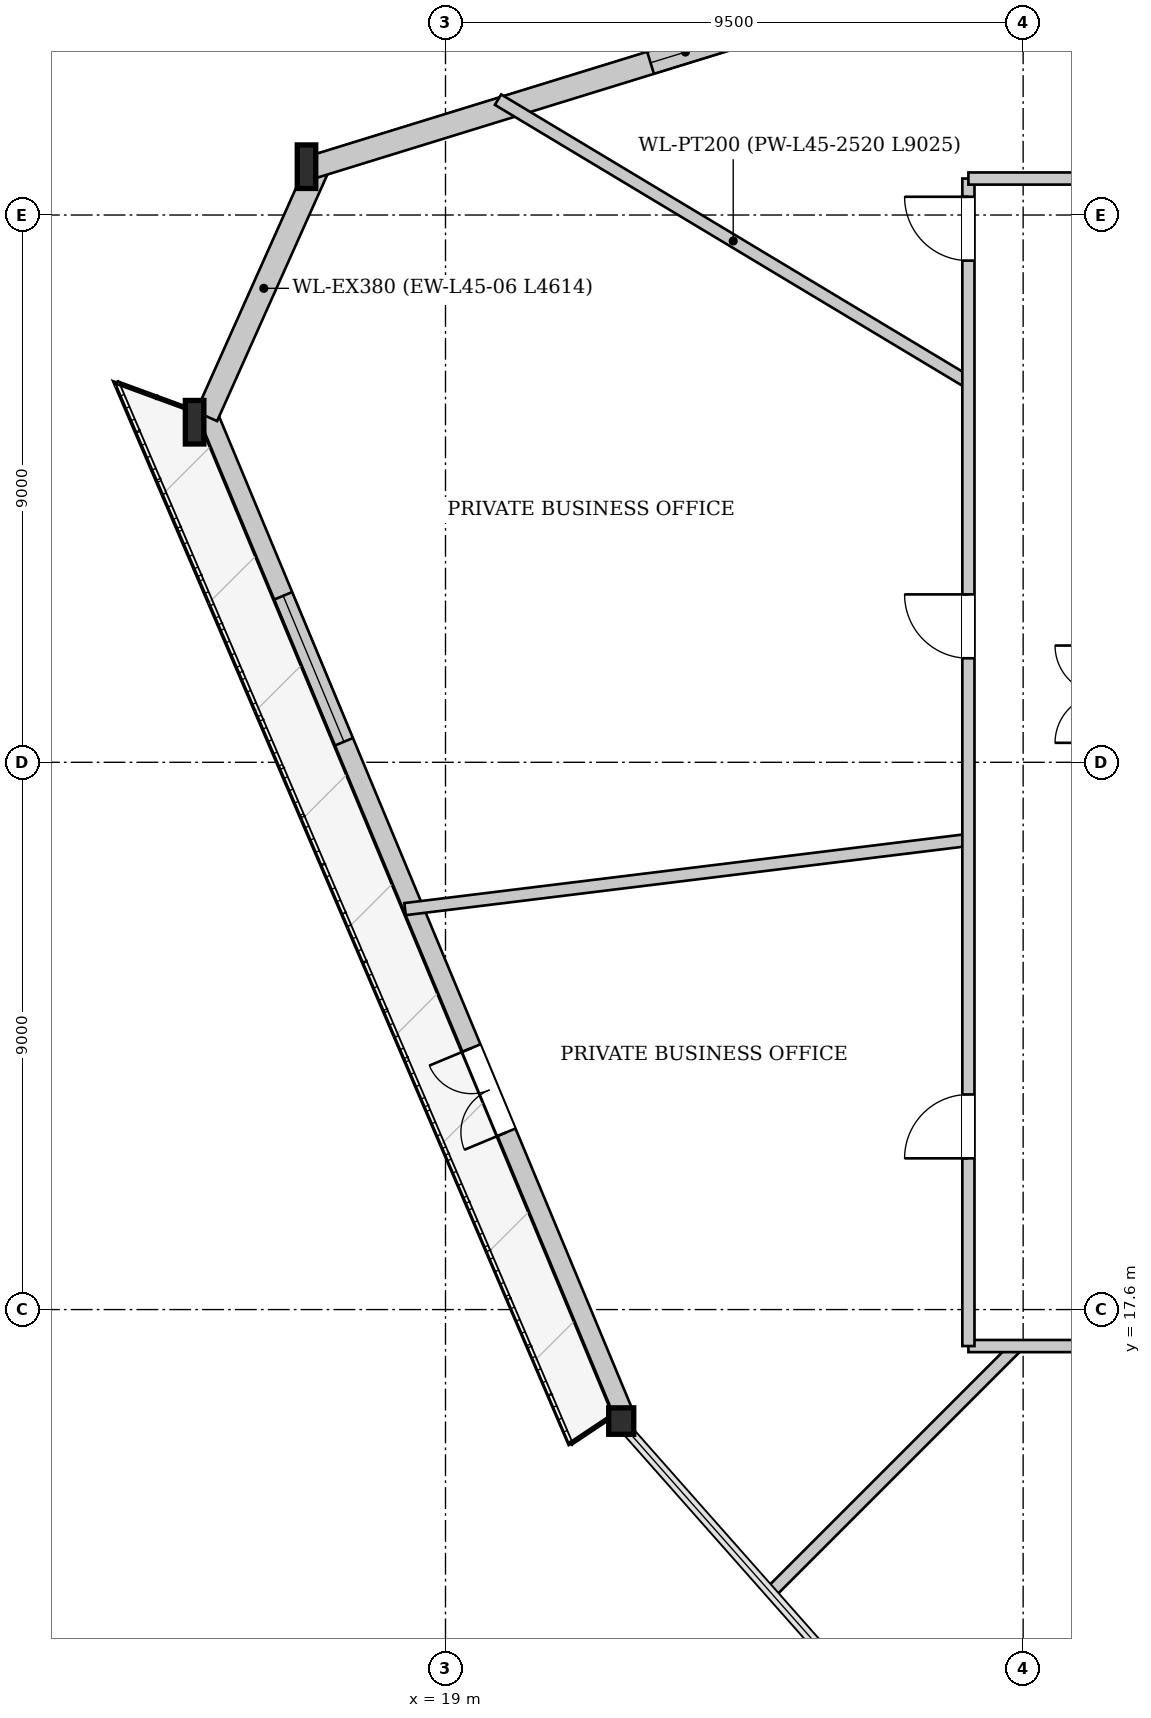
"""IFC4 building model, lengths in metres.
Left out: names, types, materials, properties, quantities, classifications, styles, units other than length and angle.
Written with IfcOpenShell. Run it as: python <this file> out.ifc"""

import sys

from ifc_helpers import new_model, si_unit, direction, frame, frame_2d, origin, origin_2d, place, context, subcontext, project, spatial, rectangle, i_section, extrude, source, transform, mapped, element, fill, save


model = new_model("IFC4")
c1 = context("Model", 3, precision=1e-05, world=origin(), true_north=direction((0.0, 1.0)))
c2 = subcontext(c1, "Body", "Model", "MODEL_VIEW")
j1 = project(units=[si_unit("LENGTHUNIT", "METRE"), si_unit("PLANEANGLEUNIT", "RADIAN")], contexts=[c1])
p1 = place(None, origin())
s1 = spatial("IfcSite", under=j1, at=p1, CompositionType="ELEMENT")
p2 = place(p1, origin())
s2 = spatial("IfcBuilding", under=s1, at=p2, CompositionType="ELEMENT")
p3 = place(p2, frame((0.0, 0.0, 171.45)))
s3 = spatial("IfcBuildingStorey", under=s2, at=p3, CompositionType="ELEMENT", Elevation=171.45)
m1 = source(origin(), c2, "Body", "SweptSolid", [
    extrude(i_section(OverallWidth=0.304, OverallDepth=0.716, WebThickness=0.021, FlangeThickness=0.04, at=origin_2d()), origin(), (0.0, 0.0, 1.0), 3.407),
])
p4 = place(p3, frame((16.781, 36.578, 0.0), z_axis=(-0.039120405694, -0.107688589299, 0.993414697693), x_axis=(0.939902925785, -0.341441781423, 0.0)))
e1 = element("IfcColumn", 1, at=p4, inside=s3, PredefinedType="COLUMN", context=c2, shape_type="MappedRepresentation", body=[
    mapped(m1, transform((0.0, 0.0, 0.0), x_axis=(1.0, 0.0, 0.0), y_axis=(0.0, 1.0, 0.0), z_axis=(0.0, 0.0, 1.0), scale=1.0)),
])
m2 = source(origin(), c2, "Body", "SweptSolid", [
    extrude(i_section(OverallWidth=0.304, OverallDepth=0.716, WebThickness=0.021, FlangeThickness=0.04, at=origin_2d()), origin(), (0.0, 0.0, 1.0), 3.403),
])
p5 = place(p3, frame((14.897, 32.366, 0.0), z_axis=(-0.013487340046, -0.102015944389, 0.994691328377), x_axis=(0.991373426138, -0.131067654089, 0.0)))
e2 = element("IfcColumn", 2, at=p5, inside=s3, PredefinedType="COLUMN", context=c2, shape_type="MappedRepresentation", body=[
    mapped(m2, transform((0.0, 0.0, 0.0), x_axis=(1.0, 0.0, 0.0), y_axis=(0.0, 1.0, 0.0), z_axis=(0.0, 0.0, 1.0), scale=1.0)),
])
m3 = source(origin(), c2, "Body", "SweptSolid", [
    extrude(i_section(OverallWidth=0.412, OverallDepth=0.435, WebThickness=0.031, FlangeThickness=0.05, at=origin_2d()), origin(), (0.0, 0.0, 1.0), 3.4),
])
p6 = place(p3, frame((21.765, 15.867, 0.0), z_axis=(0.073239735945, -0.059166218058, 0.995557783215), x_axis=(0.628408110419, 0.777883826004, 0.0)))
e3 = element("IfcColumn", 3, at=p6, inside=s3, PredefinedType="COLUMN", context=c2, shape_type="MappedRepresentation", body=[
    mapped(m3, transform((0.0, 0.0, 0.0), x_axis=(1.0, 0.0, 0.0), y_axis=(0.0, 1.0, 0.0), z_axis=(0.0, 0.0, 1.0), scale=1.0)),
])
p7 = place(p3, frame((21.913, 15.928, 0.0), z_axis=(0.0, 0.0, 1.0), x_axis=(-0.384327280835, 0.92319691356, 0.0)))
e4 = element("IfcWall", 4, at=p7, inside=s3, PredefinedType="SOLIDWALL", context=c2, shape_type="SweptSolid", body=[
    extrude(rectangle(XDim=17.872, YDim=0.32, at=frame_2d((8.936, 0.0))), origin(), (0.0, 0.0, 1.0), 2.722),
])
p8 = place(p7, frame((4.969, 0.0, 0.0)))
e5 = element("IfcOpeningElement", 5, at=p8, cuts=e4, PredefinedType="OPENING", context=c2, shape_type="SweptSolid", body=[
    extrude(rectangle(XDim=1.5, YDim=2.3, at=frame_2d((0.75, 1.15))), frame((0.0, 0.17, 0.0), z_axis=(0.0, -1.0, 0.0), x_axis=(1.0, 0.0, 0.0)), (0.0, 0.0, 1.0), 0.34),
])
p9 = place(p7, frame((11.925, 0.0, 0.252)))
e6 = element("IfcOpeningElement", 6, at=p9, cuts=e4, PredefinedType="OPENING", context=c2, shape_type="SweptSolid", body=[
    extrude(rectangle(XDim=2.6, YDim=2.35, at=frame_2d((1.3, 1.175))), frame((0.0, 0.17, 0.0), z_axis=(0.0, -1.0, 0.0), x_axis=(1.0, 0.0, 0.0)), (0.0, 0.0, 1.0), 0.34),
])
p10 = place(p3, frame((15.07, 32.289, 0.0), z_axis=(0.0, 0.0, 1.0), x_axis=(0.408277879744, 0.912857695871, 0.0)))
e7 = element("IfcWall", 7, at=p10, inside=s3, PredefinedType="SOLIDWALL", context=c2, shape_type="SweptSolid", body=[
    extrude(rectangle(XDim=4.614, YDim=0.38, at=frame_2d((2.307, 0.0))), origin(), (0.0, 0.0, 1.0), 2.722),
])
p11 = place(p3, frame((16.837, 36.396, 0.0), z_axis=(0.0, 0.0, 1.0), x_axis=(0.955604756782, 0.294651571887, 0.0)))
e8 = element("IfcWall", 8, at=p11, inside=s3, PredefinedType="SOLIDWALL", context=c2, shape_type="SweptSolid", body=[
    extrude(rectangle(XDim=22.833, YDim=0.38, at=frame_2d((11.417, 0.0))), origin(), (0.0, 0.0, 1.0), 2.722),
])
p12 = place(p11, frame((5.793, 0.0, 0.65)))
e9 = element("IfcOpeningElement", 9, at=p12, cuts=e8, PredefinedType="OPENING", context=c2, shape_type="SweptSolid", body=[
    extrude(rectangle(XDim=1.2, YDim=1.5, at=frame_2d((0.6, 0.75))), frame((0.0, 0.2, 0.0), z_axis=(0.0, -1.0, 0.0), x_axis=(1.0, 0.0, 0.0)), (0.0, 0.0, 1.0), 0.4),
])
p13 = place(p11, frame((16.59, 0.0, 0.65)))
e10 = element("IfcOpeningElement", 10, at=p13, cuts=e8, PredefinedType="OPENING", context=c2, shape_type="SweptSolid", body=[
    extrude(rectangle(XDim=1.2, YDim=1.5, at=frame_2d((0.6, 0.75))), frame((0.0, 0.2, 0.0), z_axis=(0.0, -1.0, 0.0), x_axis=(1.0, 0.0, 0.0)), (0.0, 0.0, 1.0), 0.4),
])
p14 = place(p3, frame((27.6, 32.849, 0.0), z_axis=(0.0, 0.0, 1.0), x_axis=(-0.857180094002, 0.515016782684, 0.0)))
e11 = element("IfcWall", 11, at=p14, inside=s3, PredefinedType="PARTITIONING", context=c2, shape_type="SweptSolid", body=[
    extrude(rectangle(XDim=9.025, YDim=0.2, at=frame_2d((4.513, 0.0))), origin(), (0.0, 0.0, 1.0), 3.33),
])
p15 = place(p3, frame((27.6, 25.323, 0.0), z_axis=(0.0, 0.0, 1.0), x_axis=(-0.99254512054, -0.121877740757, 0.0)))
e12 = element("IfcWall", 12, at=p15, inside=s3, PredefinedType="PARTITIONING", context=c2, shape_type="SweptSolid", body=[
    extrude(rectangle(XDim=9.335, YDim=0.2, at=frame_2d((4.667, 0.0))), origin(), (0.0, 0.0, 1.0), 3.33),
])
p16 = place(p3, frame((28.4, 17.0, 0.0), z_axis=(0.0, 0.0, 1.0), x_axis=(-0.707085365714, -0.707128196011, 0.0)))
e13 = element("IfcWall", 13, at=p16, inside=s3, PredefinedType="PARTITIONING", context=c2, shape_type="SweptSolid", body=[
    extrude(rectangle(XDim=5.7, YDim=0.2, at=frame_2d((2.85, 0.0))), origin(), (0.0, 0.0, 1.0), 3.33),
])
p17 = place(p3, frame((27.6, 17.0, 0.0), z_axis=(0.0, 0.0, 1.0), x_axis=(1.0, 0.0, 0.0)))
e14 = element("IfcWall", 14, at=p17, inside=s3, PredefinedType="PARTITIONING", context=c2, shape_type="SweptSolid", body=[
    extrude(rectangle(XDim=20.8, YDim=0.2, at=frame_2d((10.4, 0.0))), origin(), (0.0, 0.0, 1.0), 3.33),
])
p18 = place(p17, frame((4.334, 0.0, 0.0)))
e15 = element("IfcOpeningElement", 15, at=p18, cuts=e14, PredefinedType="OPENING", context=c2, shape_type="SweptSolid", body=[
    extrude(rectangle(XDim=1.05, YDim=2.2, at=frame_2d((0.525, 1.1))), frame((0.0, 0.11, 0.0), z_axis=(0.0, -1.0, 0.0), x_axis=(1.0, 0.0, 0.0)), (0.0, 0.0, 1.0), 0.22),
])
p19 = place(p17, frame((10.739, 0.0, 0.0)))
e16 = element("IfcOpeningElement", 16, at=p19, cuts=e14, PredefinedType="OPENING", context=c2, shape_type="SweptSolid", body=[
    extrude(rectangle(XDim=1.05, YDim=2.2, at=frame_2d((0.525, 1.1))), frame((0.0, 0.11, 0.0), z_axis=(0.0, -1.0, 0.0), x_axis=(1.0, 0.0, 0.0)), (0.0, 0.0, 1.0), 0.22),
])
p20 = place(p17, frame((19.45, 0.0, 0.0)))
e17 = element("IfcOpeningElement", 17, at=p20, cuts=e14, PredefinedType="OPENING", context=c2, shape_type="SweptSolid", body=[
    extrude(rectangle(XDim=1.05, YDim=2.2, at=frame_2d((0.525, 1.1))), frame((0.0, 0.11, 0.0), z_axis=(0.0, -1.0, 0.0), x_axis=(1.0, 0.0, 0.0)), (0.0, 0.0, 1.0), 0.22),
])
p21 = place(p3, frame((27.6, 17.0, 0.0), z_axis=(0.0, 0.0, 1.0), x_axis=(0.0, 1.0, 0.0)))
e18 = element("IfcWall", 18, at=p21, inside=s3, PredefinedType="PARTITIONING", context=c2, shape_type="SweptSolid", body=[
    extrude(rectangle(XDim=19.2, YDim=0.2, at=frame_2d((9.6, 0.0))), origin(), (0.0, 0.0, 1.0), 3.33),
])
p22 = place(p21, frame((11.311, 0.0, 0.0)))
e19 = element("IfcOpeningElement", 19, at=p22, cuts=e18, PredefinedType="OPENING", context=c2, shape_type="SweptSolid", body=[
    extrude(rectangle(XDim=1.05, YDim=2.2, at=frame_2d((0.525, 1.1))), frame((0.0, 0.11, 0.0), z_axis=(0.0, -1.0, 0.0), x_axis=(1.0, 0.0, 0.0)), (0.0, 0.0, 1.0), 0.22),
])
p23 = place(p21, frame((3.087, 0.0, 0.0)))
e20 = element("IfcOpeningElement", 20, at=p23, cuts=e18, PredefinedType="OPENING", context=c2, shape_type="SweptSolid", body=[
    extrude(rectangle(XDim=1.05, YDim=2.2, at=frame_2d((0.525, 1.1))), frame((0.0, 0.11, 0.0), z_axis=(0.0, -1.0, 0.0), x_axis=(1.0, 0.0, 0.0)), (0.0, 0.0, 1.0), 0.22),
])
p24 = place(p21, frame((17.85, 0.0, 0.0)))
e21 = element("IfcOpeningElement", 21, at=p24, cuts=e18, PredefinedType="OPENING", context=c2, shape_type="SweptSolid", body=[
    extrude(rectangle(XDim=1.05, YDim=2.2, at=frame_2d((0.525, 1.1))), frame((0.0, 0.11, 0.0), z_axis=(0.0, -1.0, 0.0), x_axis=(1.0, 0.0, 0.0)), (0.0, 0.0, 1.0), 0.22),
])
p25 = place(p3, frame((27.6, 36.2, 0.0), z_axis=(0.0, 0.0, 1.0), x_axis=(1.0, 0.0, 0.0)))
e22 = element("IfcWall", 22, at=p25, inside=s3, PredefinedType="PARTITIONING", context=c2, shape_type="SweptSolid", body=[
    extrude(rectangle(XDim=13.4, YDim=0.2, at=frame_2d((6.7, 0.0))), origin(), (0.0, 0.0, 1.0), 3.33),
])
p26 = place(p25, frame((9.631, 0.0, 0.0)))
e23 = element("IfcOpeningElement", 23, at=p26, cuts=e22, PredefinedType="OPENING", context=c2, shape_type="SweptSolid", body=[
    extrude(rectangle(XDim=1.05, YDim=2.2, at=frame_2d((0.525, 1.1))), frame((0.0, 0.11, 0.0), z_axis=(0.0, -1.0, 0.0), x_axis=(1.0, 0.0, 0.0)), (0.0, 0.0, 1.0), 0.22),
])
m4 = source(origin(), c2, "Body", "SweptSolid", [
    extrude(rectangle(XDim=1.5, YDim=2.3, at=frame_2d((0.75, 1.15))), frame((0.0, 0.025, 0.0), z_axis=(0.0, -1.0, 0.0), x_axis=(1.0, 0.0, 0.0)), (0.0, 0.0, 1.0), 0.05),
])
p27 = place(p8, origin())
e24 = element("IfcDoor", 24, at=p27, inside=s3, OperationType="DOUBLE_DOOR_SINGLE_SWING", PredefinedType="DOOR", context=c2, shape_type="MappedRepresentation", body=[
    mapped(m4, transform((0.0, 0.0, 0.0), x_axis=(1.0, 0.0, 0.0), y_axis=(0.0, 1.0, 0.0), z_axis=(0.0, 0.0, 1.0), scale=1.0)),
])
fill(e5, e24)
m5 = source(origin(), c2, "Body", "SweptSolid", [
    extrude(rectangle(XDim=2.6, YDim=2.35, at=frame_2d((1.3, 1.175))), frame((0.0, 0.03, 0.0), z_axis=(0.0, -1.0, 0.0), x_axis=(1.0, 0.0, 0.0)), (0.0, 0.0, 1.0), 0.06),
])
p28 = place(p9, origin())
e25 = element("IfcWindow", 25, at=p28, inside=s3, PartitioningType="SINGLE_PANEL", PredefinedType="WINDOW", context=c2, shape_type="MappedRepresentation", body=[
    mapped(m5, transform((0.0, 0.0, 0.0), x_axis=(1.0, 0.0, 0.0), y_axis=(0.0, 1.0, 0.0), z_axis=(0.0, 0.0, 1.0), scale=1.0)),
])
fill(e6, e25)
m6 = source(origin(), c2, "Body", "SweptSolid", [
    extrude(rectangle(XDim=1.2, YDim=1.5, at=frame_2d((0.6, 0.75))), frame((0.0, 0.03, 0.0), z_axis=(0.0, -1.0, 0.0), x_axis=(1.0, 0.0, 0.0)), (0.0, 0.0, 1.0), 0.06),
])
p29 = place(p12, origin())
e26 = element("IfcWindow", 26, at=p29, inside=s3, PartitioningType="SINGLE_PANEL", PredefinedType="WINDOW", context=c2, shape_type="MappedRepresentation", body=[
    mapped(m6, transform((0.0, 0.0, 0.0), x_axis=(1.0, 0.0, 0.0), y_axis=(0.0, 1.0, 0.0), z_axis=(0.0, 0.0, 1.0), scale=1.0)),
])
fill(e9, e26)
m7 = source(origin(), c2, "Body", "SweptSolid", [
    extrude(rectangle(XDim=1.05, YDim=2.2, at=frame_2d((0.525, 1.1))), frame((0.0, 0.025, 0.0), z_axis=(0.0, -1.0, 0.0), x_axis=(1.0, 0.0, 0.0)), (0.0, 0.0, 1.0), 0.05),
])
p30 = place(p22, origin())
e27 = element("IfcDoor", 27, at=p30, inside=s3, OperationType="SINGLE_SWING_RIGHT", PredefinedType="DOOR", context=c2, shape_type="MappedRepresentation", body=[
    mapped(m7, transform((0.0, 0.0, 0.0), x_axis=(1.0, 0.0, 0.0), y_axis=(0.0, 1.0, 0.0), z_axis=(0.0, 0.0, 1.0), scale=1.0)),
])
fill(e19, e27)
p31 = place(p23, origin())
e28 = element("IfcDoor", 28, at=p31, inside=s3, OperationType="SINGLE_SWING_LEFT", PredefinedType="DOOR", context=c2, shape_type="MappedRepresentation", body=[
    mapped(m7, transform((0.0, 0.0, 0.0), x_axis=(1.0, 0.0, 0.0), y_axis=(0.0, 1.0, 0.0), z_axis=(0.0, 0.0, 1.0), scale=1.0)),
])
fill(e20, e28)
p32 = place(p24, origin())
e29 = element("IfcDoor", 29, at=p32, inside=s3, OperationType="SINGLE_SWING_RIGHT", PredefinedType="DOOR", context=c2, shape_type="MappedRepresentation", body=[
    mapped(m7, transform((0.0, 0.0, 0.0), x_axis=(1.0, 0.0, 0.0), y_axis=(0.0, 1.0, 0.0), z_axis=(0.0, 0.0, 1.0), scale=1.0)),
])
fill(e21, e29)
save(model, sys.argv[1])
